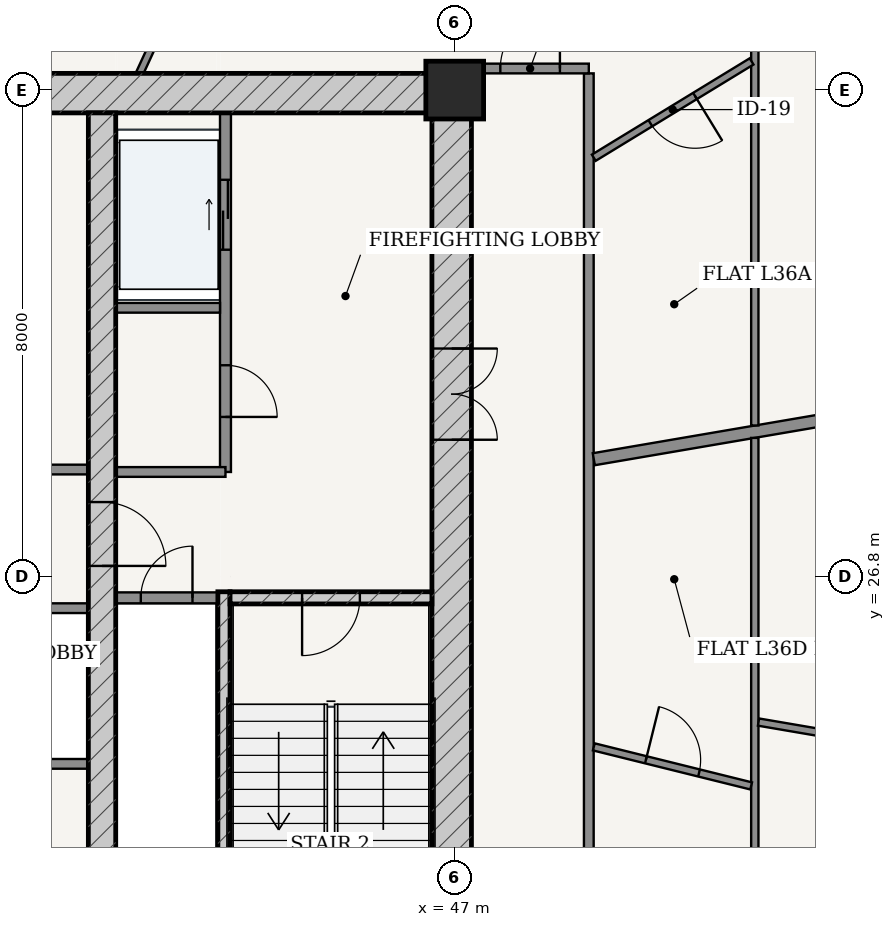
"""IFC4 building model, lengths in metres.
Left out: names, types, materials, properties, quantities, classifications, styles, units other than length and angle.
Written with IfcOpenShell. Run it as: python <this file> out.ifc"""

import sys

from ifc_helpers import new_model, si_unit, direction, frame, frame_2d, origin, origin_2d, place, context, subcontext, project, spatial, rectangle, extrude, source, transform, mapped, element, fill, save


model = new_model("IFC4")
c1 = context("Model", 3, precision=1e-05, world=origin(), true_north=direction((-0.2419218956, 0.970295726276)))
c2 = subcontext(c1, "Body", "Model", "MODEL_VIEW")
j1 = project(units=[si_unit("LENGTHUNIT", "METRE"), si_unit("PLANEANGLEUNIT", "RADIAN")], contexts=[c1])
p1 = place(None, origin())
s1 = spatial("IfcSite", under=j1, at=p1, CompositionType="ELEMENT")
p2 = place(p1, origin())
s2 = spatial("IfcBuilding", under=s1, at=p2, CompositionType="ELEMENT")
p3 = place(p2, frame((0.0, 0.0, 139.0)))
s3 = spatial("IfcBuildingStorey", under=s2, at=p3, CompositionType="ELEMENT", Elevation=139.0)
p4 = place(p3, frame((47.0, 34.8, 0.0), z_axis=(0.0, 0.0, 1.0), x_axis=(1.0, 0.0, 0.0)))
e1 = element("IfcColumn", 1, at=p4, inside=s3, PredefinedType="COLUMN", context=c2, shape_type="SweptSolid", body=[
    extrude(rectangle(XDim=0.95, YDim=0.95, at=origin_2d()), origin(), (0.0, 0.0, 1.0), 3.6),
])
p5 = place(p3, frame((28.725, 34.75, 0.0), z_axis=(0.0, 0.0, 1.0), x_axis=(1.0, 0.0, 0.0)))
e2 = element("IfcWall", 2, at=p5, inside=s3, PredefinedType="SHEAR", context=c2, shape_type="SweptSolid", body=[
    extrude(rectangle(XDim=18.55, YDim=0.65, at=frame_2d((9.275, 0.0))), origin(), (0.0, 0.0, 1.0), 3.33),
])
p6 = place(p3, frame((46.95, 19.175, 0.0), z_axis=(0.0, 0.0, 1.0), x_axis=(0.0, 1.0, 0.0)))
e3 = element("IfcWall", 3, at=p6, inside=s3, PredefinedType="SHEAR", context=c2, shape_type="SweptSolid", body=[
    extrude(rectangle(XDim=15.25, YDim=0.65, at=frame_2d((7.625, 0.0))), origin(), (0.0, 0.0, 1.0), 3.33),
])
p7 = place(p6, frame((9.875, 0.0, 0.0)))
e4 = element("IfcOpeningElement", 4, at=p7, cuts=e3, PredefinedType="OPENING", context=c2, shape_type="SweptSolid", body=[
    extrude(rectangle(XDim=1.5, YDim=2.2, at=frame_2d((0.75, 1.1))), frame((0.0, 0.335, 0.0), z_axis=(0.0, -1.0, 0.0), x_axis=(1.0, 0.0, 0.0)), (0.0, 0.0, 1.0), 0.67),
])
p8 = place(p3, frame((43.205, 19.175, 0.0), z_axis=(0.0, 0.0, 1.0), x_axis=(0.0, 1.0, 0.0)))
e5 = element("IfcWall", 5, at=p8, inside=s3, PredefinedType="SOLIDWALL", context=c2, shape_type="SweptSolid", body=[
    extrude(rectangle(XDim=7.375, YDim=0.2, at=frame_2d((3.688, 0.0))), origin(), (0.0, 0.0, 1.0), 3.33),
])
p9 = place(p3, frame((43.305, 26.45, 0.0), z_axis=(0.0, 0.0, 1.0), x_axis=(1.0, 0.0, 0.0)))
e6 = element("IfcWall", 6, at=p9, inside=s3, PredefinedType="SOLIDWALL", context=c2, shape_type="SweptSolid", body=[
    extrude(rectangle(XDim=3.32, YDim=0.2, at=frame_2d((1.66, 0.0))), origin(), (0.0, 0.0, 1.0), 3.33),
])
p10 = place(p9, frame((1.185, 0.0, 0.0)))
e7 = element("IfcOpeningElement", 7, at=p10, cuts=e6, PredefinedType="OPENING", context=c2, shape_type="SweptSolid", body=[
    extrude(rectangle(XDim=0.95, YDim=2.15, at=frame_2d((0.475, 1.075))), frame((0.0, 0.11, 0.0), z_axis=(0.0, -1.0, 0.0), x_axis=(1.0, 0.0, 0.0)), (0.0, 0.0, 1.0), 0.22),
])
p11 = place(p3, frame((41.2, 19.175, 0.0), z_axis=(0.0, 0.0, 1.0), x_axis=(0.0, 1.0, 0.0)))
e8 = element("IfcWall", 8, at=p11, inside=s3, PredefinedType="SHEAR", context=c2, shape_type="SweptSolid", body=[
    extrude(rectangle(XDim=15.25, YDim=0.45, at=frame_2d((7.625, 0.0))), origin(), (0.0, 0.0, 1.0), 3.33),
])
p12 = place(p11, frame((7.8, 0.0, 0.0)))
e9 = element("IfcOpeningElement", 9, at=p12, cuts=e8, PredefinedType="OPENING", context=c2, shape_type="SweptSolid", body=[
    extrude(rectangle(XDim=1.05, YDim=2.15, at=frame_2d((0.525, 1.075))), frame((0.0, 0.235, 0.0), z_axis=(0.0, -1.0, 0.0), x_axis=(1.0, 0.0, 0.0)), (0.0, 0.0, 1.0), 0.47),
])
p13 = place(p3, frame((41.425, 26.45, 0.0), z_axis=(0.0, 0.0, 1.0), x_axis=(1.0, 0.0, 0.0)))
e10 = element("IfcWall", 10, at=p13, inside=s3, PredefinedType="PARTITIONING", context=c2, shape_type="SweptSolid", body=[
    extrude(rectangle(XDim=1.675, YDim=0.18, at=frame_2d((0.837, 0.0))), origin(), (0.0, 0.0, 1.0), 3.33),
])
p14 = place(p13, frame((0.413, 0.0, 0.0)))
e11 = element("IfcOpeningElement", 11, at=p14, cuts=e10, PredefinedType="OPENING", context=c2, shape_type="SweptSolid", body=[
    extrude(rectangle(XDim=0.85, YDim=2.1, at=frame_2d((0.425, 1.05))), frame((0.0, 0.1, 0.0), z_axis=(0.0, -1.0, 0.0), x_axis=(1.0, 0.0, 0.0)), (0.0, 0.0, 1.0), 0.2),
])
p15 = place(p3, frame((43.23, 28.52, 0.0), z_axis=(0.0, 0.0, 1.0), x_axis=(0.0, 1.0, 0.0)))
e12 = element("IfcWall", 12, at=p15, inside=s3, PredefinedType="PARTITIONING", context=c2, shape_type="SweptSolid", body=[
    extrude(rectangle(XDim=5.905, YDim=0.18, at=frame_2d((2.953, 0.0))), origin(), (0.0, 0.0, 1.0), 3.33),
])
p16 = place(p15, frame((0.905, 0.0, 0.0)))
e13 = element("IfcOpeningElement", 13, at=p16, cuts=e12, PredefinedType="OPENING", context=c2, shape_type="SweptSolid", body=[
    extrude(rectangle(XDim=0.85, YDim=2.1, at=frame_2d((0.425, 1.05))), frame((0.0, 0.1, 0.0), z_axis=(0.0, -1.0, 0.0), x_axis=(1.0, 0.0, 0.0)), (0.0, 0.0, 1.0), 0.2),
])
p17 = place(p15, frame((3.655, 0.0, 0.0)))
e14 = element("IfcOpeningElement", 14, at=p17, cuts=e12, PredefinedType="OPENING", context=c2, shape_type="SweptSolid", body=[
    extrude(rectangle(XDim=1.15, YDim=2.2, at=frame_2d((0.575, 1.1))), frame((0.0, 0.1, 0.0), z_axis=(0.0, -1.0, 0.0), x_axis=(1.0, 0.0, 0.0)), (0.0, 0.0, 1.0), 0.2),
])
p18 = place(p3, frame((41.425, 31.22, 0.0), z_axis=(0.0, 0.0, 1.0), x_axis=(1.0, 0.0, 0.0)))
e15 = element("IfcWall", 15, at=p18, inside=s3, PredefinedType="PARTITIONING", context=c2, shape_type="SweptSolid", body=[
    extrude(rectangle(XDim=1.715, YDim=0.16, at=frame_2d((0.857, 0.0))), origin(), (0.0, 0.0, 1.0), 3.33),
])
p19 = place(p3, frame((41.425, 28.52, 0.0), z_axis=(0.0, 0.0, 1.0), x_axis=(1.0, 0.0, 0.0)))
e16 = element("IfcWall", 16, at=p19, inside=s3, PredefinedType="PARTITIONING", context=c2, shape_type="SweptSolid", body=[
    extrude(rectangle(XDim=1.805, YDim=0.16, at=frame_2d((0.902, 0.0))), origin(), (0.0, 0.0, 1.0), 3.33),
])
p20 = place(p3, frame((35.025, 28.56, 0.0), z_axis=(0.0, 0.0, 1.0), x_axis=(1.0, 0.0, 0.0)))
e17 = element("IfcWall", 17, at=p20, inside=s3, PredefinedType="PARTITIONING", context=c2, shape_type="SweptSolid", body=[
    extrude(rectangle(XDim=5.95, YDim=0.16, at=frame_2d((2.975, 0.0))), origin(), (0.0, 0.0, 1.0), 3.33),
])
p21 = place(p20, frame((1.008, 0.0, 0.0)))
e18 = element("IfcOpeningElement", 18, at=p21, cuts=e17, PredefinedType="OPENING", context=c2, shape_type="SweptSolid", body=[
    extrude(rectangle(XDim=0.86, YDim=2.1, at=frame_2d((0.43, 1.05))), frame((0.0, 0.09, 0.0), z_axis=(0.0, -1.0, 0.0), x_axis=(1.0, 0.0, 0.0)), (0.0, 0.0, 1.0), 0.18),
])
p22 = place(p20, frame((4.087, 0.0, 0.0)))
e19 = element("IfcOpeningElement", 19, at=p22, cuts=e17, PredefinedType="OPENING", context=c2, shape_type="SweptSolid", body=[
    extrude(rectangle(XDim=0.85, YDim=2.1, at=frame_2d((0.425, 1.05))), frame((0.0, 0.09, 0.0), z_axis=(0.0, -1.0, 0.0), x_axis=(1.0, 0.0, 0.0)), (0.0, 0.0, 1.0), 0.18),
])
p23 = place(p3, frame((35.025, 26.28, 0.0), z_axis=(0.0, 0.0, 1.0), x_axis=(1.0, 0.0, 0.0)))
e20 = element("IfcWall", 20, at=p23, inside=s3, PredefinedType="PARTITIONING", context=c2, shape_type="SweptSolid", body=[
    extrude(rectangle(XDim=5.95, YDim=0.16, at=frame_2d((2.975, 0.0))), origin(), (0.0, 0.0, 1.0), 3.33),
])
p24 = place(p23, frame((0.19, 0.0, 0.0)))
e21 = element("IfcOpeningElement", 21, at=p24, cuts=e20, PredefinedType="OPENING", context=c2, shape_type="SweptSolid", body=[
    extrude(rectangle(XDim=1.1, YDim=2.2, at=frame_2d((0.55, 1.1))), frame((0.0, 0.09, 0.0), z_axis=(0.0, -1.0, 0.0), x_axis=(1.0, 0.0, 0.0)), (0.0, 0.0, 1.0), 0.18),
])
p25 = place(p23, frame((1.67, 0.0, 0.0)))
e22 = element("IfcOpeningElement", 22, at=p25, cuts=e20, PredefinedType="OPENING", context=c2, shape_type="SweptSolid", body=[
    extrude(rectangle(XDim=1.1, YDim=2.2, at=frame_2d((0.55, 1.1))), frame((0.0, 0.09, 0.0), z_axis=(0.0, -1.0, 0.0), x_axis=(1.0, 0.0, 0.0)), (0.0, 0.0, 1.0), 0.18),
])
p26 = place(p3, frame((35.025, 23.72, 0.0), z_axis=(0.0, 0.0, 1.0), x_axis=(1.0, 0.0, 0.0)))
e23 = element("IfcWall", 23, at=p26, inside=s3, PredefinedType="PARTITIONING", context=c2, shape_type="SweptSolid", body=[
    extrude(rectangle(XDim=5.95, YDim=0.16, at=frame_2d((2.975, 0.0))), origin(), (0.0, 0.0, 1.0), 3.33),
])
p27 = place(p3, frame((49.205, 16.675, 0.0), z_axis=(0.0, 0.0, 1.0), x_axis=(0.0, 1.0, 0.0)))
e24 = element("IfcWall", 24, at=p27, inside=s3, PredefinedType="PARTITIONING", context=c2, shape_type="SweptSolid", body=[
    extrude(rectangle(XDim=18.4, YDim=0.16, at=frame_2d((9.2, 0.0))), origin(), (0.0, 0.0, 1.0), 2.776),
])
p28 = place(p3, frame((47.275, 35.155, 0.0), z_axis=(0.0, 0.0, 1.0), x_axis=(1.0, 0.0, 0.0)))
e25 = element("IfcWall", 25, at=p28, inside=s3, PredefinedType="PARTITIONING", context=c2, shape_type="SweptSolid", body=[
    extrude(rectangle(XDim=1.93, YDim=0.16, at=frame_2d((0.965, 0.0))), origin(), (0.0, 0.0, 1.0), 2.776),
])
p29 = place(p28, frame((0.475, 0.0, 0.0)))
e26 = element("IfcOpeningElement", 26, at=p29, cuts=e25, PredefinedType="OPENING", context=c2, shape_type="SweptSolid", body=[
    extrude(rectangle(XDim=0.98, YDim=2.2, at=frame_2d((0.49, 1.1))), frame((0.0, 0.09, 0.0), z_axis=(0.0, -1.0, 0.0), x_axis=(1.0, 0.0, 0.0)), (0.0, 0.0, 1.0), 0.18),
])
p30 = place(p3, frame((49.287, 28.73, 0.0), z_axis=(0.0, 0.0, 1.0), x_axis=(0.985698993845, 0.168515558725, 0.0)))
e27 = element("IfcWall", 27, at=p30, inside=s3, PredefinedType="PARTITIONING", context=c2, shape_type="SweptSolid", body=[
    extrude(rectangle(XDim=12.517, YDim=0.2, at=frame_2d((6.259, 0.0))), origin(), (0.0, 0.0, 1.0), 2.776),
])
p31 = place(p3, frame((51.935, 37.885, 0.0), z_axis=(0.0, 0.0, 1.0), x_axis=(0.0, -1.0, 0.0)))
e28 = element("IfcWall", 28, at=p31, inside=s3, PredefinedType="PARTITIONING", context=c2, shape_type="SweptSolid", body=[
    extrude(rectangle(XDim=8.601, YDim=0.12, at=frame_2d((4.3, 0.0))), origin(), (0.0, 0.0, 1.0), 2.776),
])
p32 = place(p31, frame((1.021, 0.0, 0.0)))
e29 = element("IfcOpeningElement", 29, at=p32, cuts=e28, PredefinedType="OPENING", context=c2, shape_type="SweptSolid", body=[
    extrude(rectangle(XDim=0.9, YDim=2.15, at=frame_2d((0.45, 1.075))), frame((0.0, 0.07, 0.0), z_axis=(0.0, -1.0, 0.0), x_axis=(1.0, 0.0, 0.0)), (0.0, 0.0, 1.0), 0.14),
])
p33 = place(p3, frame((49.287, 33.688, 0.0), z_axis=(0.0, 0.0, 1.0), x_axis=(0.853628993111, 0.520881504874, 0.0)))
e30 = element("IfcWall", 30, at=p33, inside=s3, PredefinedType="PARTITIONING", context=c2, shape_type="SweptSolid", body=[
    extrude(rectangle(XDim=3.041, YDim=0.12, at=frame_2d((1.52, 0.0))), origin(), (0.0, 0.0, 1.0), 3.005),
])
p34 = place(p33, frame((1.09, 0.0, 0.0)))
e31 = element("IfcOpeningElement", 31, at=p34, cuts=e30, PredefinedType="OPENING", context=c2, shape_type="SweptSolid", body=[
    extrude(rectangle(XDim=0.86, YDim=2.15, at=frame_2d((0.43, 1.075))), frame((0.0, 0.07, 0.0), z_axis=(0.0, -1.0, 0.0), x_axis=(1.0, 0.0, 0.0)), (0.0, 0.0, 1.0), 0.14),
])
p35 = place(p3, frame((41.817, 35.075, 0.0), z_axis=(0.0, 0.0, 1.0), x_axis=(0.418890148101, 0.908036917655, 0.0)))
e32 = element("IfcWall", 32, at=p35, inside=s3, PredefinedType="PARTITIONING", context=c2, shape_type="SweptSolid", body=[
    extrude(rectangle(XDim=2.856, YDim=0.12, at=frame_2d((1.428, 0.0))), origin(), (0.0, 0.0, 1.0), 3.33),
])
p36 = place(p35, frame((0.978, 0.0, 0.0)))
e33 = element("IfcOpeningElement", 33, at=p36, cuts=e32, PredefinedType="OPENING", context=c2, shape_type="SweptSolid", body=[
    extrude(rectangle(XDim=0.9, YDim=2.15, at=frame_2d((0.45, 1.075))), frame((0.0, 0.07, 0.0), z_axis=(0.0, -1.0, 0.0), x_axis=(1.0, 0.0, 0.0)), (0.0, 0.0, 1.0), 0.14),
])
p37 = place(p3, frame((51.935, 29.08, 0.0), z_axis=(0.0, 0.0, 1.0), x_axis=(0.0, -1.0, 0.0)))
e34 = element("IfcWall", 34, at=p37, inside=s3, PredefinedType="PARTITIONING", context=c2, shape_type="SweptSolid", body=[
    extrude(rectangle(XDim=15.215, YDim=0.12, at=frame_2d((7.608, 0.0))), origin(), (0.0, 0.0, 1.0), 2.776),
])
p38 = place(p37, frame((11.859, 0.0, 0.0)))
e35 = element("IfcOpeningElement", 35, at=p38, cuts=e34, PredefinedType="OPENING", context=c2, shape_type="SweptSolid", body=[
    extrude(rectangle(XDim=0.9, YDim=2.15, at=frame_2d((0.45, 1.075))), frame((0.0, 0.07, 0.0), z_axis=(0.0, -1.0, 0.0), x_axis=(1.0, 0.0, 0.0)), (0.0, 0.0, 1.0), 0.14),
])
p39 = place(p37, frame((7.49, 0.0, 0.0)))
e36 = element("IfcOpeningElement", 36, at=p39, cuts=e34, PredefinedType="OPENING", context=c2, shape_type="SweptSolid", body=[
    extrude(rectangle(XDim=0.9, YDim=2.15, at=frame_2d((0.45, 1.075))), frame((0.0, 0.07, 0.0), z_axis=(0.0, -1.0, 0.0), x_axis=(1.0, 0.0, 0.0)), (0.0, 0.0, 1.0), 0.14),
])
p40 = place(p3, frame((51.996, 24.407, 0.0), z_axis=(0.0, 0.0, 1.0), x_axis=(0.985698378271, -0.168519159369, 0.0)))
e37 = element("IfcWall", 37, at=p40, inside=s3, PredefinedType="PARTITIONING", context=c2, shape_type="SweptSolid", body=[
    extrude(rectangle(XDim=9.769, YDim=0.12, at=frame_2d((4.884, 0.0))), origin(), (0.0, 0.0, 1.0), 2.776),
])
p41 = place(p40, frame((3.428, 0.0, 0.0)))
e38 = element("IfcOpeningElement", 38, at=p41, cuts=e37, PredefinedType="OPENING", context=c2, shape_type="SweptSolid", body=[
    extrude(rectangle(XDim=0.9, YDim=2.15, at=frame_2d((0.45, 1.075))), frame((0.0, 0.07, 0.0), z_axis=(0.0, -1.0, 0.0), x_axis=(1.0, 0.0, 0.0)), (0.0, 0.0, 1.0), 0.14),
])
p42 = place(p3, frame((49.287, 23.999, 0.0), z_axis=(0.0, 0.0, 1.0), x_axis=(0.970571855633, -0.240811696256, 0.0)))
e39 = element("IfcWall", 39, at=p42, inside=s3, PredefinedType="PARTITIONING", context=c2, shape_type="SweptSolid", body=[
    extrude(rectangle(XDim=2.666, YDim=0.12, at=frame_2d((1.333, 0.0))), origin(), (0.0, 0.0, 1.0), 3.33),
])
p43 = place(p42, frame((0.883, 0.0, 0.0)))
e40 = element("IfcOpeningElement", 40, at=p43, cuts=e39, PredefinedType="OPENING", context=c2, shape_type="SweptSolid", body=[
    extrude(rectangle(XDim=0.9, YDim=2.15, at=frame_2d((0.45, 1.075))), frame((0.0, 0.07, 0.0), z_axis=(0.0, -1.0, 0.0), x_axis=(1.0, 0.0, 0.0)), (0.0, 0.0, 1.0), 0.14),
])
m1 = source(origin(), c2, "Body", "SweptSolid", [
    extrude(rectangle(XDim=1.5, YDim=2.2, at=frame_2d((0.75, 1.1))), frame((0.0, 0.025, 0.0), z_axis=(0.0, -1.0, 0.0), x_axis=(1.0, 0.0, 0.0)), (0.0, 0.0, 1.0), 0.05),
])
p44 = place(p7, frame((1.5, 0.0, 0.0), z_axis=(0.0, 0.0, 1.0), x_axis=(-1.0, 0.0, 0.0)))
e41 = element("IfcDoor", 41, at=p44, inside=s3, OperationType="DOUBLE_DOOR_SINGLE_SWING", PredefinedType="DOOR", context=c2, shape_type="MappedRepresentation", body=[
    mapped(m1, transform((0.0, 0.0, 0.0), scale=1.0)),
])
fill(e4, e41)
m2 = source(origin(), c2, "Body", "SweptSolid", [
    extrude(rectangle(XDim=1.05, YDim=2.15, at=frame_2d((0.525, 1.075))), frame((0.0, 0.025, 0.0), z_axis=(0.0, -1.0, 0.0), x_axis=(1.0, 0.0, 0.0)), (0.0, 0.0, 1.0), 0.05),
])
p45 = place(p12, frame((1.05, 0.0, 0.0), z_axis=(0.0, 0.0, 1.0), x_axis=(-1.0, 0.0, 0.0)))
e42 = element("IfcDoor", 42, at=p45, inside=s3, OperationType="SINGLE_SWING_RIGHT", PredefinedType="DOOR", context=c2, shape_type="MappedRepresentation", body=[
    mapped(m2, transform((0.0, 0.0, 0.0), scale=1.0)),
])
fill(e9, e42)
m3 = source(origin(), c2, "Body", "SweptSolid", [
    extrude(rectangle(XDim=0.95, YDim=2.15, at=frame_2d((0.475, 1.075))), frame((0.0, 0.025, 0.0), z_axis=(0.0, -1.0, 0.0), x_axis=(1.0, 0.0, 0.0)), (0.0, 0.0, 1.0), 0.05),
])
p46 = place(p10, frame((0.95, 0.0, 0.0), z_axis=(0.0, 0.0, 1.0), x_axis=(-1.0, 0.0, 0.0)))
e43 = element("IfcDoor", 43, at=p46, inside=s3, OperationType="SINGLE_SWING_RIGHT", PredefinedType="DOOR", context=c2, shape_type="MappedRepresentation", body=[
    mapped(m3, transform((0.0, 0.0, 0.0), scale=1.0)),
])
fill(e7, e43)
m4 = source(origin(), c2, "Body", "SweptSolid", [
    extrude(rectangle(XDim=0.85, YDim=2.1, at=frame_2d((0.425, 1.05))), frame((0.0, 0.025, 0.0), z_axis=(0.0, -1.0, 0.0), x_axis=(1.0, 0.0, 0.0)), (0.0, 0.0, 1.0), 0.05),
])
p47 = place(p14, origin())
e44 = element("IfcDoor", 44, at=p47, inside=s3, OperationType="SINGLE_SWING_RIGHT", PredefinedType="DOOR", context=c2, shape_type="MappedRepresentation", body=[
    mapped(m4, transform((0.0, 0.0, 0.0), scale=1.0)),
])
fill(e11, e44)
p48 = place(p16, frame((0.85, 0.0, 0.0), z_axis=(0.0, 0.0, 1.0), x_axis=(-1.0, 0.0, 0.0)))
e45 = element("IfcDoor", 45, at=p48, inside=s3, OperationType="SINGLE_SWING_RIGHT", PredefinedType="DOOR", context=c2, shape_type="MappedRepresentation", body=[
    mapped(m4, transform((0.0, 0.0, 0.0), scale=1.0)),
])
fill(e13, e45)
m5 = source(origin(), c2, "Body", "SweptSolid", [
    extrude(rectangle(XDim=1.15, YDim=2.2, at=frame_2d((0.575, 1.1))), frame((0.0, 0.025, 0.0), z_axis=(0.0, -1.0, 0.0), x_axis=(1.0, 0.0, 0.0)), (0.0, 0.0, 1.0), 0.05),
])
p49 = place(p17, origin())
e46 = element("IfcDoor", 46, at=p49, inside=s3, OperationType="DOUBLE_DOOR_SLIDING", PredefinedType="DOOR", context=c2, shape_type="MappedRepresentation", body=[
    mapped(m5, transform((0.0, 0.0, 0.0), scale=1.0)),
])
fill(e14, e46)
m6 = source(origin(), c2, "Body", "SweptSolid", [
    extrude(rectangle(XDim=0.98, YDim=2.2, at=frame_2d((0.49, 1.1))), frame((0.0, 0.025, 0.0), z_axis=(0.0, -1.0, 0.0), x_axis=(1.0, 0.0, 0.0)), (0.0, 0.0, 1.0), 0.05),
])
p50 = place(p29, origin())
e47 = element("IfcDoor", 47, at=p50, inside=s3, OperationType="SINGLE_SWING_RIGHT", PredefinedType="DOOR", context=c2, shape_type="MappedRepresentation", body=[
    mapped(m6, transform((0.0, 0.0, 0.0), scale=1.0)),
])
fill(e26, e47)
m7 = source(origin(), c2, "Body", "SweptSolid", [
    extrude(rectangle(XDim=0.86, YDim=2.15, at=frame_2d((0.43, 1.075))), frame((0.0, 0.025, 0.0), z_axis=(0.0, -1.0, 0.0), x_axis=(1.0, 0.0, 0.0)), (0.0, 0.0, 1.0), 0.05),
])
p51 = place(p34, frame((0.86, 0.0, 0.0), z_axis=(0.0, 0.0, 1.0), x_axis=(-1.0, 0.0, 0.0)))
e48 = element("IfcDoor", 48, at=p51, inside=s3, OperationType="SINGLE_SWING_LEFT", PredefinedType="DOOR", context=c2, shape_type="MappedRepresentation", body=[
    mapped(m7, transform((0.0, 0.0, 0.0), scale=1.0)),
])
fill(e31, e48)
m8 = source(origin(), c2, "Body", "SweptSolid", [
    extrude(rectangle(XDim=0.9, YDim=2.15, at=frame_2d((0.45, 1.075))), frame((0.0, 0.025, 0.0), z_axis=(0.0, -1.0, 0.0), x_axis=(1.0, 0.0, 0.0)), (0.0, 0.0, 1.0), 0.05),
])
p52 = place(p43, origin())
e49 = element("IfcDoor", 49, at=p52, inside=s3, OperationType="SINGLE_SWING_LEFT", PredefinedType="DOOR", context=c2, shape_type="MappedRepresentation", body=[
    mapped(m8, transform((0.0, 0.0, 0.0), scale=1.0)),
])
fill(e40, e49)
save(model, sys.argv[1])
